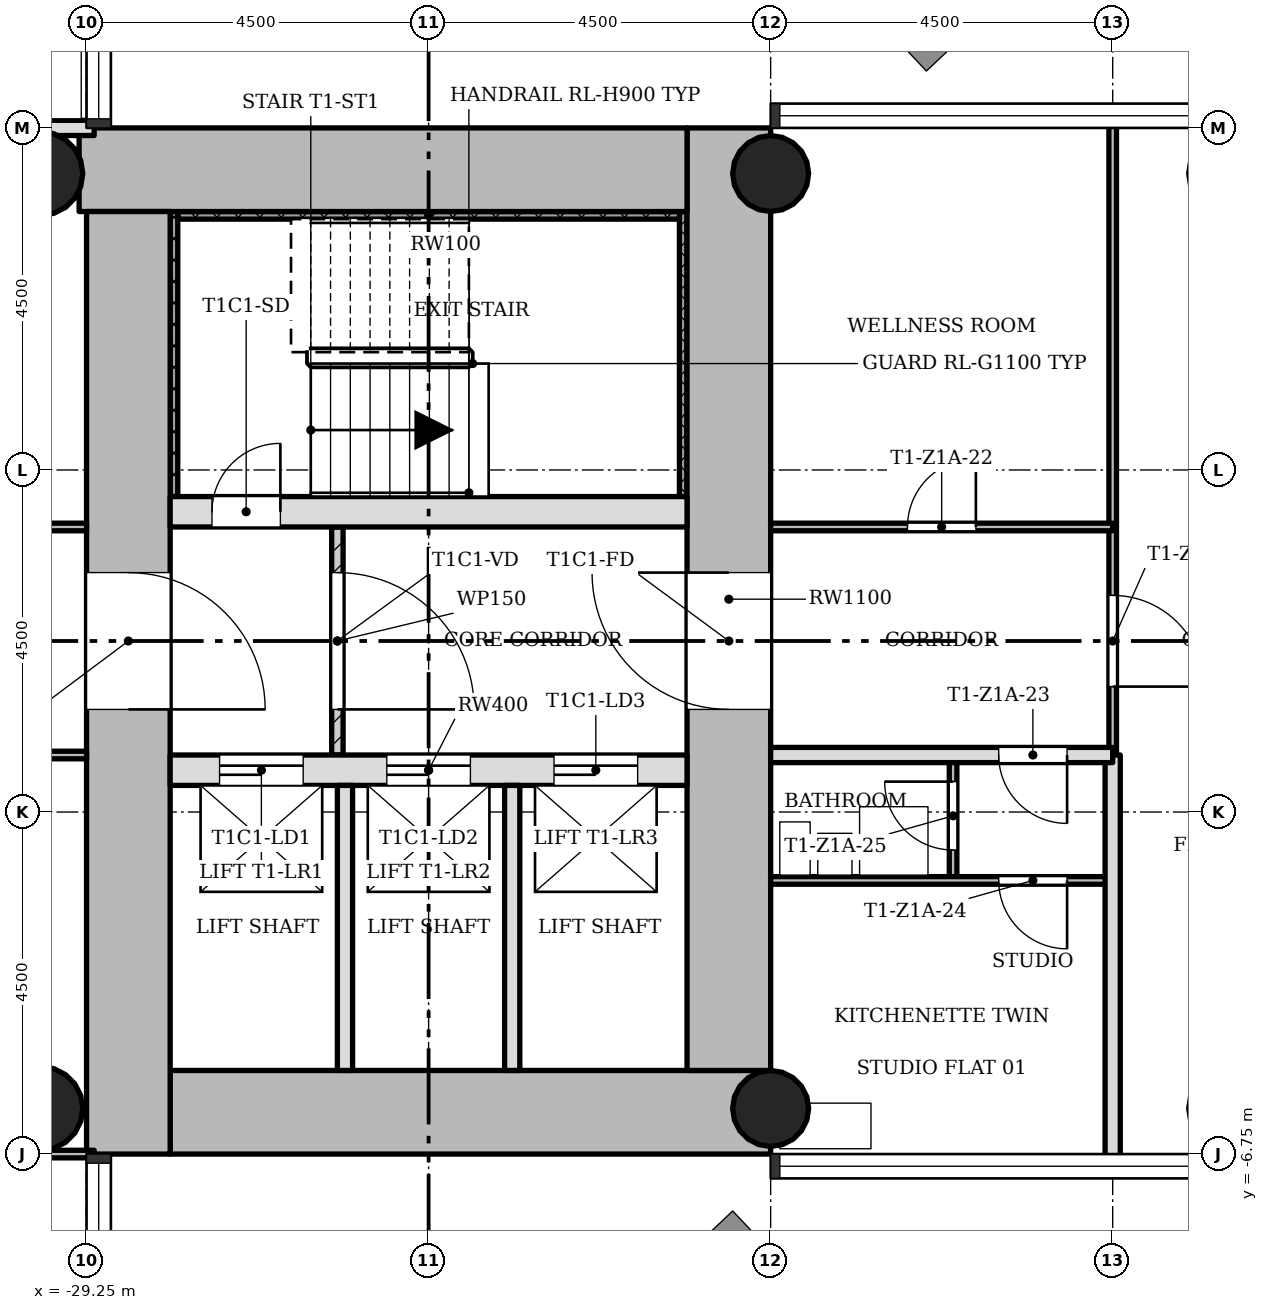
"""IFC4 building model, lengths in metres.
Left out: names, types, materials, properties, quantities, classifications, styles, units other than length and angle.
Written with IfcOpenShell. Run it as: python <this file> out.ifc"""

import sys

from ifc_helpers import new_model, si_unit, direction, frame, frame_2d, origin, origin_2d, place, context, subcontext, project, spatial, rectangle, hollow_circle, extrude, element, fill, save


model = new_model("IFC4")
c1 = context("Model", 3, precision=1e-05, world=origin(), true_north=direction((0.0, 1.0)))
c2 = subcontext(c1, "Body", "Model", "MODEL_VIEW")
j1 = project(units=[si_unit("LENGTHUNIT", "METRE"), si_unit("PLANEANGLEUNIT", "RADIAN")], contexts=[c1])
p1 = place(None, origin())
s1 = spatial("IfcSite", under=j1, at=p1, CompositionType="ELEMENT")
p2 = place(p1, origin())
s2 = spatial("IfcBuilding", under=s1, at=p2, CompositionType="ELEMENT")
p3 = place(p2, frame((0.0, 0.0, 31.3)))
s3 = spatial("IfcBuildingStorey", under=s2, at=p3, CompositionType="ELEMENT", Elevation=31.3)
p4 = place(p3, frame((-28.15, -6.2, 0.0), z_axis=(0.0, 0.0, 1.0), x_axis=(1.0, 0.0, 0.0)))
e1 = element("IfcWall", 1, at=p4, inside=s3, PredefinedType="SHEAR", context=c2, shape_type="SweptSolid", body=[
    extrude(rectangle(XDim=7.9, YDim=1.1, at=frame_2d((3.95, 0.0))), origin(), (0.0, 0.0, 1.0), 3.4),
])
p5 = place(p3, frame((-20.8, -5.65, 0.0), z_axis=(0.0, 0.0, 1.0), x_axis=(0.0, 1.0, 0.0)))
e2 = element("IfcWall", 2, at=p5, inside=s3, PredefinedType="SHEAR", context=c2, shape_type="SweptSolid", body=[
    extrude(rectangle(XDim=12.4, YDim=1.1, at=frame_2d((6.2, 0.0))), origin(), (0.0, 0.0, 1.0), 3.4),
])
p6 = place(p5, frame((4.75, 0.0, 0.0)))
e3 = element("IfcOpeningElement", 3, at=p6, cuts=e2, PredefinedType="OPENING", context=c2, shape_type="SweptSolid", body=[
    extrude(rectangle(XDim=1.8, YDim=2.1, at=frame_2d((0.9, 1.05))), frame((0.0, 0.56, 0.0), z_axis=(0.0, -1.0, 0.0), x_axis=(1.0, 0.0, 0.0)), (0.0, 0.0, 1.0), 1.12),
])
p7 = place(p3, frame((-21.35, 6.2, 0.0), z_axis=(0.0, 0.0, 1.0), x_axis=(-1.0, 0.0, 0.0)))
e4 = element("IfcWall", 4, at=p7, inside=s3, PredefinedType="SHEAR", context=c2, shape_type="SweptSolid", body=[
    extrude(rectangle(XDim=7.998, YDim=1.1, at=frame_2d((3.999, 0.0))), origin(), (0.0, 0.0, 1.0), 3.4),
])
p8 = place(p3, frame((-28.7, 5.65, 0.0), z_axis=(0.0, 0.0, 1.0), x_axis=(0.0, -1.0, 0.0)))
e5 = element("IfcWall", 5, at=p8, inside=s3, PredefinedType="SHEAR", context=c2, shape_type="SweptSolid", body=[
    extrude(rectangle(XDim=12.4, YDim=1.1, at=frame_2d((6.2, 0.0))), origin(), (0.0, 0.0, 1.0), 3.4),
])
p9 = place(p8, frame((4.75, 0.0, 0.0)))
e6 = element("IfcOpeningElement", 6, at=p9, cuts=e5, PredefinedType="OPENING", context=c2, shape_type="SweptSolid", body=[
    extrude(rectangle(XDim=1.8, YDim=2.1, at=frame_2d((0.9, 1.05))), frame((0.0, 0.56, 0.0), z_axis=(0.0, -1.0, 0.0), x_axis=(1.0, 0.0, 0.0)), (0.0, 0.0, 1.0), 1.12),
])
p10 = place(p3, frame((-28.15, -1.7, 0.0), z_axis=(0.0, 0.0, 1.0), x_axis=(1.0, 0.0, 0.0)))
e7 = element("IfcWall", 7, at=p10, inside=s3, PredefinedType="SHEAR", context=c2, shape_type="SweptSolid", body=[
    extrude(rectangle(XDim=6.8, YDim=0.4, at=frame_2d((3.4, 0.0))), origin(), (0.0, 0.0, 1.0), 3.4),
])
p11 = place(p10, frame((0.65, 0.0, 0.0)))
e8 = element("IfcOpeningElement", 8, at=p11, cuts=e7, PredefinedType="OPENING", context=c2, shape_type="SweptSolid", body=[
    extrude(rectangle(XDim=1.1, YDim=2.1, at=frame_2d((0.55, 1.05))), frame((0.0, 0.21, 0.0), z_axis=(0.0, -1.0, 0.0), x_axis=(1.0, 0.0, 0.0)), (0.0, 0.0, 1.0), 0.42),
])
p12 = place(p10, frame((2.85, 0.0, 0.0)))
e9 = element("IfcOpeningElement", 9, at=p12, cuts=e7, PredefinedType="OPENING", context=c2, shape_type="SweptSolid", body=[
    extrude(rectangle(XDim=1.1, YDim=2.1, at=frame_2d((0.55, 1.05))), frame((0.0, 0.21, 0.0), z_axis=(0.0, -1.0, 0.0), x_axis=(1.0, 0.0, 0.0)), (0.0, 0.0, 1.0), 0.42),
])
p13 = place(p10, frame((5.05, 0.0, 0.0)))
e10 = element("IfcOpeningElement", 10, at=p13, cuts=e7, PredefinedType="OPENING", context=c2, shape_type="SweptSolid", body=[
    extrude(rectangle(XDim=1.1, YDim=2.1, at=frame_2d((0.55, 1.05))), frame((0.0, 0.21, 0.0), z_axis=(0.0, -1.0, 0.0), x_axis=(1.0, 0.0, 0.0)), (0.0, 0.0, 1.0), 0.42),
])
p14 = place(p3, frame((-28.15, 1.7, 0.0), z_axis=(0.0, 0.0, 1.0), x_axis=(1.0, 0.0, 0.0)))
e11 = element("IfcWall", 11, at=p14, inside=s3, PredefinedType="SHEAR", context=c2, shape_type="SweptSolid", body=[
    extrude(rectangle(XDim=6.8, YDim=0.4, at=frame_2d((3.4, 0.0))), origin(), (0.0, 0.0, 1.0), 3.4),
])
p15 = place(p14, frame((0.55, 0.0, 0.0)))
e12 = element("IfcOpeningElement", 12, at=p15, cuts=e11, PredefinedType="OPENING", context=c2, shape_type="SweptSolid", body=[
    extrude(rectangle(XDim=0.9, YDim=2.1, at=frame_2d((0.45, 1.05))), frame((0.0, 0.21, 0.0), z_axis=(0.0, -1.0, 0.0), x_axis=(1.0, 0.0, 0.0)), (0.0, 0.0, 1.0), 0.42),
])
for number, where, z_axis, x_axis in (
    (13, (-20.25, -6.15, 0.0), (0.0, 0.0, 1.0), (1.0, 0.0, 0.0)),
    (14, (-20.25, 6.15, 0.0), (0.0, 0.0, 1.0), (1.0, 0.0, 0.0)),
):
    element("IfcColumn", number, at=place(p3, frame(where, z_axis=z_axis, x_axis=x_axis)), inside=s3, PredefinedType="COLUMN", context=c2, shape_type="SweptSolid", body=[
        extrude(hollow_circle(Radius=0.5, WallThickness=0.036, at=origin_2d()), origin(), (0.0, 0.0, 1.0), 3.4),
    ])
for number, where, z_axis, x_axis in (
    (15, (-29.85, -6.15, 0.0), (0.0, 0.0, 1.0), (1.0, 0.0, 0.0)),
    (16, (-29.85, 6.15, 0.0), (0.0, 0.0, 1.0), (1.0, 0.0, 0.0)),
):
    element("IfcColumn", number, at=place(p3, frame(where, z_axis=z_axis, x_axis=x_axis)), inside=s3, PredefinedType="COLUMN", context=c2, shape_type="SweptSolid", body=[
        extrude(hollow_circle(Radius=0.55, WallThickness=0.04, at=origin_2d()), origin(), (0.0, 0.0, 1.0), 3.4),
    ])
p16 = place(p3, frame((-25.95, -1.5, 0.0), z_axis=(0.0, 0.0, 1.0), x_axis=(0.0, 1.0, 0.0)))
e17 = element("IfcWall", 17, at=p16, inside=s3, PredefinedType="PARTITIONING", context=c2, shape_type="SweptSolid", body=[
    extrude(rectangle(XDim=3.0, YDim=0.15, at=frame_2d((1.5, 0.0))), origin(), (0.0, 0.0, 1.0), 3.0),
])
p17 = place(p16, frame((0.6, 0.0, 0.0)))
e18 = element("IfcOpeningElement", 18, at=p17, cuts=e17, PredefinedType="OPENING", context=c2, shape_type="SweptSolid", body=[
    extrude(rectangle(XDim=1.8, YDim=2.1, at=frame_2d((0.9, 1.05))), frame((0.0, 0.085, 0.0), z_axis=(0.0, -1.0, 0.0), x_axis=(1.0, 0.0, 0.0)), (0.0, 0.0, 1.0), 0.17),
])
for number, where, z_axis, x_axis in (
    (19, (-25.85, -5.65, 0.0), (0.0, 0.0, 1.0), (0.0, 1.0, 0.0)),
    (20, (-23.65, -5.65, 0.0), (0.0, 0.0, 1.0), (0.0, 1.0, 0.0)),
):
    element("IfcWall", number, at=place(p3, frame(where, z_axis=z_axis, x_axis=x_axis)), inside=s3, PredefinedType="SOLIDWALL", context=c2, shape_type="SweptSolid", body=[
        extrude(rectangle(XDim=3.75, YDim=0.2, at=frame_2d((1.875, 0.0))), origin(), (0.0, 0.0, 1.0), 3.0),
    ])
p18 = place(p3, frame((-17.85, -3.15, 0.0), z_axis=(0.0, 0.0, 1.0), x_axis=(0.0, 1.0, 0.0)))
e21 = element("IfcWall", 21, at=p18, inside=s3, PredefinedType="PARTITIONING", context=c2, shape_type="SweptSolid", body=[
    extrude(rectangle(XDim=1.65, YDim=0.1, at=frame_2d((0.825, 0.0))), origin(), (0.0, 0.0, 1.0), 3.0),
])
p19 = place(p18, frame((0.4, 0.0, 0.0)))
e22 = element("IfcOpeningElement", 22, at=p19, cuts=e21, PredefinedType="OPENING", context=c2, shape_type="SweptSolid", body=[
    extrude(rectangle(XDim=0.9, YDim=2.1, at=frame_2d((0.45, 1.05))), frame((0.0, 0.06, 0.0), z_axis=(0.0, -1.0, 0.0), x_axis=(1.0, 0.0, 0.0)), (0.0, 0.0, 1.0), 0.12),
])
p20 = place(p3, frame((-15.75, -1.5, 0.0), z_axis=(0.0, 0.0, 1.0), x_axis=(0.0, 1.0, 0.0)))
e23 = element("IfcWall", 23, at=p20, inside=s3, PredefinedType="PARTITIONING", context=c2, shape_type="SweptSolid", body=[
    extrude(rectangle(XDim=8.35, YDim=0.1, at=frame_2d((4.175, 0.0))), origin(), (0.0, 0.0, 1.0), 3.0),
])
p21 = place(p20, frame((0.9, 0.0, 0.0)))
e24 = element("IfcOpeningElement", 24, at=p21, cuts=e23, PredefinedType="OPENING", context=c2, shape_type="SweptSolid", body=[
    extrude(rectangle(XDim=1.2, YDim=2.1, at=frame_2d((0.6, 1.05))), frame((0.0, 0.06, 0.0), z_axis=(0.0, -1.0, 0.0), x_axis=(1.0, 0.0, 0.0)), (0.0, 0.0, 1.0), 0.12),
])
p22 = place(p3, frame((-15.75, -6.85, 0.0), z_axis=(0.0, 0.0, 1.0), x_axis=(0.0, 1.0, 0.0)))
e25 = element("IfcWall", 25, at=p22, inside=s3, PredefinedType="SOLIDWALL", context=c2, shape_type="SweptSolid", body=[
    extrude(rectangle(XDim=5.35, YDim=0.2, at=frame_2d((2.675, 0.0))), origin(), (0.0, 0.0, 1.0), 3.0),
])
p23 = place(p3, frame((-35.1, -6.75, 0.0), z_axis=(0.0, 0.0, 1.0), x_axis=(1.0, 0.0, 0.0)))
e26 = element("IfcWall", 26, at=p23, inside=s3, PredefinedType="PARTITIONING", context=c2, shape_type="SweptSolid", body=[
    extrude(rectangle(XDim=5.95, YDim=0.1, at=frame_2d((2.975, 0.0))), origin(), (0.0, 0.0, 1.0), 3.0),
])
p24 = place(p3, frame((-20.25, -3.15, 0.0), z_axis=(0.0, 0.0, 1.0), x_axis=(1.0, 0.0, 0.0)))
e27 = element("IfcWall", 27, at=p24, inside=s3, PredefinedType="PARTITIONING", context=c2, shape_type="SweptSolid", body=[
    extrude(rectangle(XDim=4.5, YDim=0.1, at=frame_2d((2.25, 0.0))), origin(), (0.0, 0.0, 1.0), 3.0),
])
p25 = place(p24, frame((3.0, 0.0, 0.0)))
e28 = element("IfcOpeningElement", 28, at=p25, cuts=e27, PredefinedType="OPENING", context=c2, shape_type="SweptSolid", body=[
    extrude(rectangle(XDim=0.9, YDim=2.1, at=frame_2d((0.45, 1.05))), frame((0.0, 0.06, 0.0), z_axis=(0.0, -1.0, 0.0), x_axis=(1.0, 0.0, 0.0)), (0.0, 0.0, 1.0), 0.12),
])
p26 = place(p3, frame((-35.1, -1.5, 0.0), z_axis=(0.0, 0.0, 1.0), x_axis=(1.0, 0.0, 0.0)))
e29 = element("IfcWall", 29, at=p26, inside=s3, PredefinedType="PARTITIONING", context=c2, shape_type="SweptSolid", body=[
    extrude(rectangle(XDim=5.85, YDim=0.1, at=frame_2d((2.925, 0.0))), origin(), (0.0, 0.0, 1.0), 3.0),
])
p27 = place(p26, frame((2.475, 0.0, 0.0)))
e30 = element("IfcOpeningElement", 30, at=p27, cuts=e29, PredefinedType="OPENING", context=c2, shape_type="SweptSolid", body=[
    extrude(rectangle(XDim=0.9, YDim=2.1, at=frame_2d((0.45, 1.05))), frame((0.0, 0.06, 0.0), z_axis=(0.0, -1.0, 0.0), x_axis=(1.0, 0.0, 0.0)), (0.0, 0.0, 1.0), 0.12),
])
p28 = place(p3, frame((-20.25, -1.5, 0.0), z_axis=(0.0, 0.0, 1.0), x_axis=(1.0, 0.0, 0.0)))
e31 = element("IfcWall", 31, at=p28, inside=s3, PredefinedType="SOLIDWALL", context=c2, shape_type="SweptSolid", body=[
    extrude(rectangle(XDim=4.5, YDim=0.2, at=frame_2d((2.25, 0.0))), origin(), (0.0, 0.0, 1.0), 3.0),
])
p29 = place(p28, frame((3.0, 0.0, 0.0)))
e32 = element("IfcOpeningElement", 32, at=p29, cuts=e31, PredefinedType="OPENING", context=c2, shape_type="SweptSolid", body=[
    extrude(rectangle(XDim=0.9, YDim=2.1, at=frame_2d((0.45, 1.05))), frame((0.0, 0.11, 0.0), z_axis=(0.0, -1.0, 0.0), x_axis=(1.0, 0.0, 0.0)), (0.0, 0.0, 1.0), 0.22),
])
p30 = place(p3, frame((-35.1, 1.5, 0.0), z_axis=(0.0, 0.0, 1.0), x_axis=(1.0, 0.0, 0.0)))
e33 = element("IfcWall", 33, at=p30, inside=s3, PredefinedType="PARTITIONING", context=c2, shape_type="SweptSolid", body=[
    extrude(rectangle(XDim=5.85, YDim=0.1, at=frame_2d((2.925, 0.0))), origin(), (0.0, 0.0, 1.0), 3.0),
])
p31 = place(p30, frame((3.375, 0.0, 0.0)))
e34 = element("IfcOpeningElement", 34, at=p31, cuts=e33, PredefinedType="OPENING", context=c2, shape_type="SweptSolid", body=[
    extrude(rectangle(XDim=0.9, YDim=2.1, at=frame_2d((0.45, 1.05))), frame((0.0, 0.06, 0.0), z_axis=(0.0, -1.0, 0.0), x_axis=(1.0, 0.0, 0.0)), (0.0, 0.0, 1.0), 0.12),
])
p32 = place(p3, frame((-20.25, 1.5, 0.0), z_axis=(0.0, 0.0, 1.0), x_axis=(1.0, 0.0, 0.0)))
e35 = element("IfcWall", 35, at=p32, inside=s3, PredefinedType="PARTITIONING", context=c2, shape_type="SweptSolid", body=[
    extrude(rectangle(XDim=4.5, YDim=0.1, at=frame_2d((2.25, 0.0))), origin(), (0.0, 0.0, 1.0), 3.0),
])
p33 = place(p32, frame((1.8, 0.0, 0.0)))
e36 = element("IfcOpeningElement", 36, at=p33, cuts=e35, PredefinedType="OPENING", context=c2, shape_type="SweptSolid", body=[
    extrude(rectangle(XDim=0.9, YDim=2.1, at=frame_2d((0.45, 1.05))), frame((0.0, 0.06, 0.0), z_axis=(0.0, -1.0, 0.0), x_axis=(1.0, 0.0, 0.0)), (0.0, 0.0, 1.0), 0.12),
])
p34 = place(p3, frame((-42.85, 6.75, 0.0), z_axis=(0.0, 0.0, 1.0), x_axis=(1.0, 0.0, 0.0)))
e37 = element("IfcWall", 37, at=p34, inside=s3, PredefinedType="SOLIDWALL", context=c2, shape_type="SweptSolid", body=[
    extrude(rectangle(XDim=13.7, YDim=0.2, at=frame_2d((6.85, 0.0))), origin(), (0.0, 0.0, 1.0), 3.0),
])
p35 = place(p34, frame((6.4, 0.0, 0.0)))
e38 = element("IfcOpeningElement", 38, at=p35, cuts=e37, PredefinedType="OPENING", context=c2, shape_type="SweptSolid", body=[
    extrude(rectangle(XDim=0.9, YDim=2.1, at=frame_2d((0.45, 1.05))), frame((0.0, 0.11, 0.0), z_axis=(0.0, -1.0, 0.0), x_axis=(1.0, 0.0, 0.0)), (0.0, 0.0, 1.0), 0.22),
])
p36 = place(p3, frame((-21.4, 1.9, 0.0), z_axis=(0.0, 0.0, 1.0), x_axis=(0.0, 1.0, 0.0)))
e39 = element("IfcWall", 39, at=p36, inside=s3, PredefinedType="SHEAR", context=c2, shape_type="SweptSolid", body=[
    extrude(rectangle(XDim=3.75, YDim=0.1, at=frame_2d((1.875, 0.0))), origin(), (0.0, 0.0, 1.0), 3.4),
])
p37 = place(p3, frame((-28.05, 5.6, 0.0), z_axis=(0.0, 0.0, 1.0), x_axis=(1.0, 0.0, 0.0)))
e40 = element("IfcWall", 40, at=p37, inside=s3, PredefinedType="SHEAR", context=c2, shape_type="SweptSolid", body=[
    extrude(rectangle(XDim=6.6, YDim=0.1, at=frame_2d((3.3, 0.0))), origin(), (0.0, 0.0, 1.0), 3.4),
])
p38 = place(p3, frame((-28.1, 1.9, 0.0), z_axis=(0.0, 0.0, 1.0), x_axis=(0.0, 1.0, 0.0)))
e41 = element("IfcWall", 41, at=p38, inside=s3, PredefinedType="SHEAR", context=c2, shape_type="SweptSolid", body=[
    extrude(rectangle(XDim=3.75, YDim=0.1, at=frame_2d((1.875, 0.0))), origin(), (0.0, 0.0, 1.0), 3.4),
])
p39 = place(p17, origin())
e42 = element("IfcDoor", 42, at=p39, inside=s3, OperationType="SINGLE_SWING_LEFT", PredefinedType="DOOR", context=c2, shape_type="SweptSolid", body=[
    extrude(rectangle(XDim=1.8, YDim=2.1, at=frame_2d((0.9, 1.05))), frame((0.0, 0.025, 0.0), z_axis=(0.0, -1.0, 0.0), x_axis=(1.0, 0.0, 0.0)), (0.0, 0.0, 1.0), 0.05),
])
fill(e18, e42)
p40 = place(p33, origin())
e43 = element("IfcDoor", 43, at=p40, inside=s3, OperationType="SINGLE_SWING_LEFT", PredefinedType="DOOR", context=c2, shape_type="SweptSolid", body=[
    extrude(rectangle(XDim=0.9, YDim=2.1, at=frame_2d((0.45, 1.05))), frame((0.0, 0.025, 0.0), z_axis=(0.0, -1.0, 0.0), x_axis=(1.0, 0.0, 0.0)), (0.0, 0.0, 1.0), 0.05),
])
fill(e36, e43)
p41 = place(p29, origin())
e44 = element("IfcDoor", 44, at=p41, inside=s3, OperationType="SINGLE_SWING_RIGHT", PredefinedType="DOOR", context=c2, shape_type="SweptSolid", body=[
    extrude(rectangle(XDim=0.9, YDim=2.1, at=frame_2d((0.45, 1.05))), frame((0.0, 0.025, 0.0), z_axis=(0.0, -1.0, 0.0), x_axis=(1.0, 0.0, 0.0)), (0.0, 0.0, 1.0), 0.05),
])
fill(e32, e44)
p42 = place(p25, origin())
e45 = element("IfcDoor", 45, at=p42, inside=s3, OperationType="SINGLE_SWING_RIGHT", PredefinedType="DOOR", context=c2, shape_type="SweptSolid", body=[
    extrude(rectangle(XDim=0.9, YDim=2.1, at=frame_2d((0.45, 1.05))), frame((0.0, 0.025, 0.0), z_axis=(0.0, -1.0, 0.0), x_axis=(1.0, 0.0, 0.0)), (0.0, 0.0, 1.0), 0.05),
])
fill(e28, e45)
p43 = place(p19, origin())
e46 = element("IfcDoor", 46, at=p43, inside=s3, OperationType="SINGLE_SWING_LEFT", PredefinedType="DOOR", context=c2, shape_type="SweptSolid", body=[
    extrude(rectangle(XDim=0.9, YDim=2.1, at=frame_2d((0.45, 1.05))), frame((0.0, 0.025, 0.0), z_axis=(0.0, -1.0, 0.0), x_axis=(1.0, 0.0, 0.0)), (0.0, 0.0, 1.0), 0.05),
])
fill(e22, e46)
p44 = place(p21, origin())
e47 = element("IfcDoor", 47, at=p44, inside=s3, OperationType="SINGLE_SWING_LEFT", PredefinedType="DOOR", context=c2, shape_type="SweptSolid", body=[
    extrude(rectangle(XDim=1.2, YDim=2.1, at=frame_2d((0.6, 1.05))), frame((0.0, 0.025, 0.0), z_axis=(0.0, -1.0, 0.0), x_axis=(1.0, 0.0, 0.0)), (0.0, 0.0, 1.0), 0.05),
])
fill(e24, e47)
p45 = place(p15, origin())
e48 = element("IfcDoor", 48, at=p45, inside=s3, OperationType="SINGLE_SWING_LEFT", PredefinedType="DOOR", context=c2, shape_type="SweptSolid", body=[
    extrude(rectangle(XDim=0.9, YDim=2.1, at=frame_2d((0.45, 1.05))), frame((0.0, 0.025, 0.0), z_axis=(0.0, -1.0, 0.0), x_axis=(1.0, 0.0, 0.0)), (0.0, 0.0, 1.0), 0.05),
])
fill(e12, e48)
p46 = place(p11, origin())
e49 = element("IfcDoor", 49, at=p46, inside=s3, OperationType="SLIDING_TO_LEFT", PredefinedType="DOOR", context=c2, shape_type="SweptSolid", body=[
    extrude(rectangle(XDim=1.1, YDim=2.1, at=frame_2d((0.55, 1.05))), frame((0.0, 0.025, 0.0), z_axis=(0.0, -1.0, 0.0), x_axis=(1.0, 0.0, 0.0)), (0.0, 0.0, 1.0), 0.05),
])
fill(e8, e49)
p47 = place(p12, origin())
e50 = element("IfcDoor", 50, at=p47, inside=s3, OperationType="SLIDING_TO_LEFT", PredefinedType="DOOR", context=c2, shape_type="SweptSolid", body=[
    extrude(rectangle(XDim=1.1, YDim=2.1, at=frame_2d((0.55, 1.05))), frame((0.0, 0.025, 0.0), z_axis=(0.0, -1.0, 0.0), x_axis=(1.0, 0.0, 0.0)), (0.0, 0.0, 1.0), 0.05),
])
fill(e9, e50)
p48 = place(p13, origin())
e51 = element("IfcDoor", 51, at=p48, inside=s3, OperationType="SLIDING_TO_LEFT", PredefinedType="DOOR", context=c2, shape_type="SweptSolid", body=[
    extrude(rectangle(XDim=1.1, YDim=2.1, at=frame_2d((0.55, 1.05))), frame((0.0, 0.025, 0.0), z_axis=(0.0, -1.0, 0.0), x_axis=(1.0, 0.0, 0.0)), (0.0, 0.0, 1.0), 0.05),
])
fill(e10, e51)
p49 = place(p9, origin())
e52 = element("IfcDoor", 52, at=p49, inside=s3, OperationType="SINGLE_SWING_LEFT", PredefinedType="DOOR", context=c2, shape_type="SweptSolid", body=[
    extrude(rectangle(XDim=1.8, YDim=2.1, at=frame_2d((0.9, 1.05))), frame((0.0, 0.025, 0.0), z_axis=(0.0, -1.0, 0.0), x_axis=(1.0, 0.0, 0.0)), (0.0, 0.0, 1.0), 0.05),
])
fill(e6, e52)
p50 = place(p6, origin())
e53 = element("IfcDoor", 53, at=p50, inside=s3, OperationType="SINGLE_SWING_LEFT", PredefinedType="DOOR", context=c2, shape_type="SweptSolid", body=[
    extrude(rectangle(XDim=1.8, YDim=2.1, at=frame_2d((0.9, 1.05))), frame((0.0, 0.025, 0.0), z_axis=(0.0, -1.0, 0.0), x_axis=(1.0, 0.0, 0.0)), (0.0, 0.0, 1.0), 0.05),
])
fill(e3, e53)
save(model, sys.argv[1])
